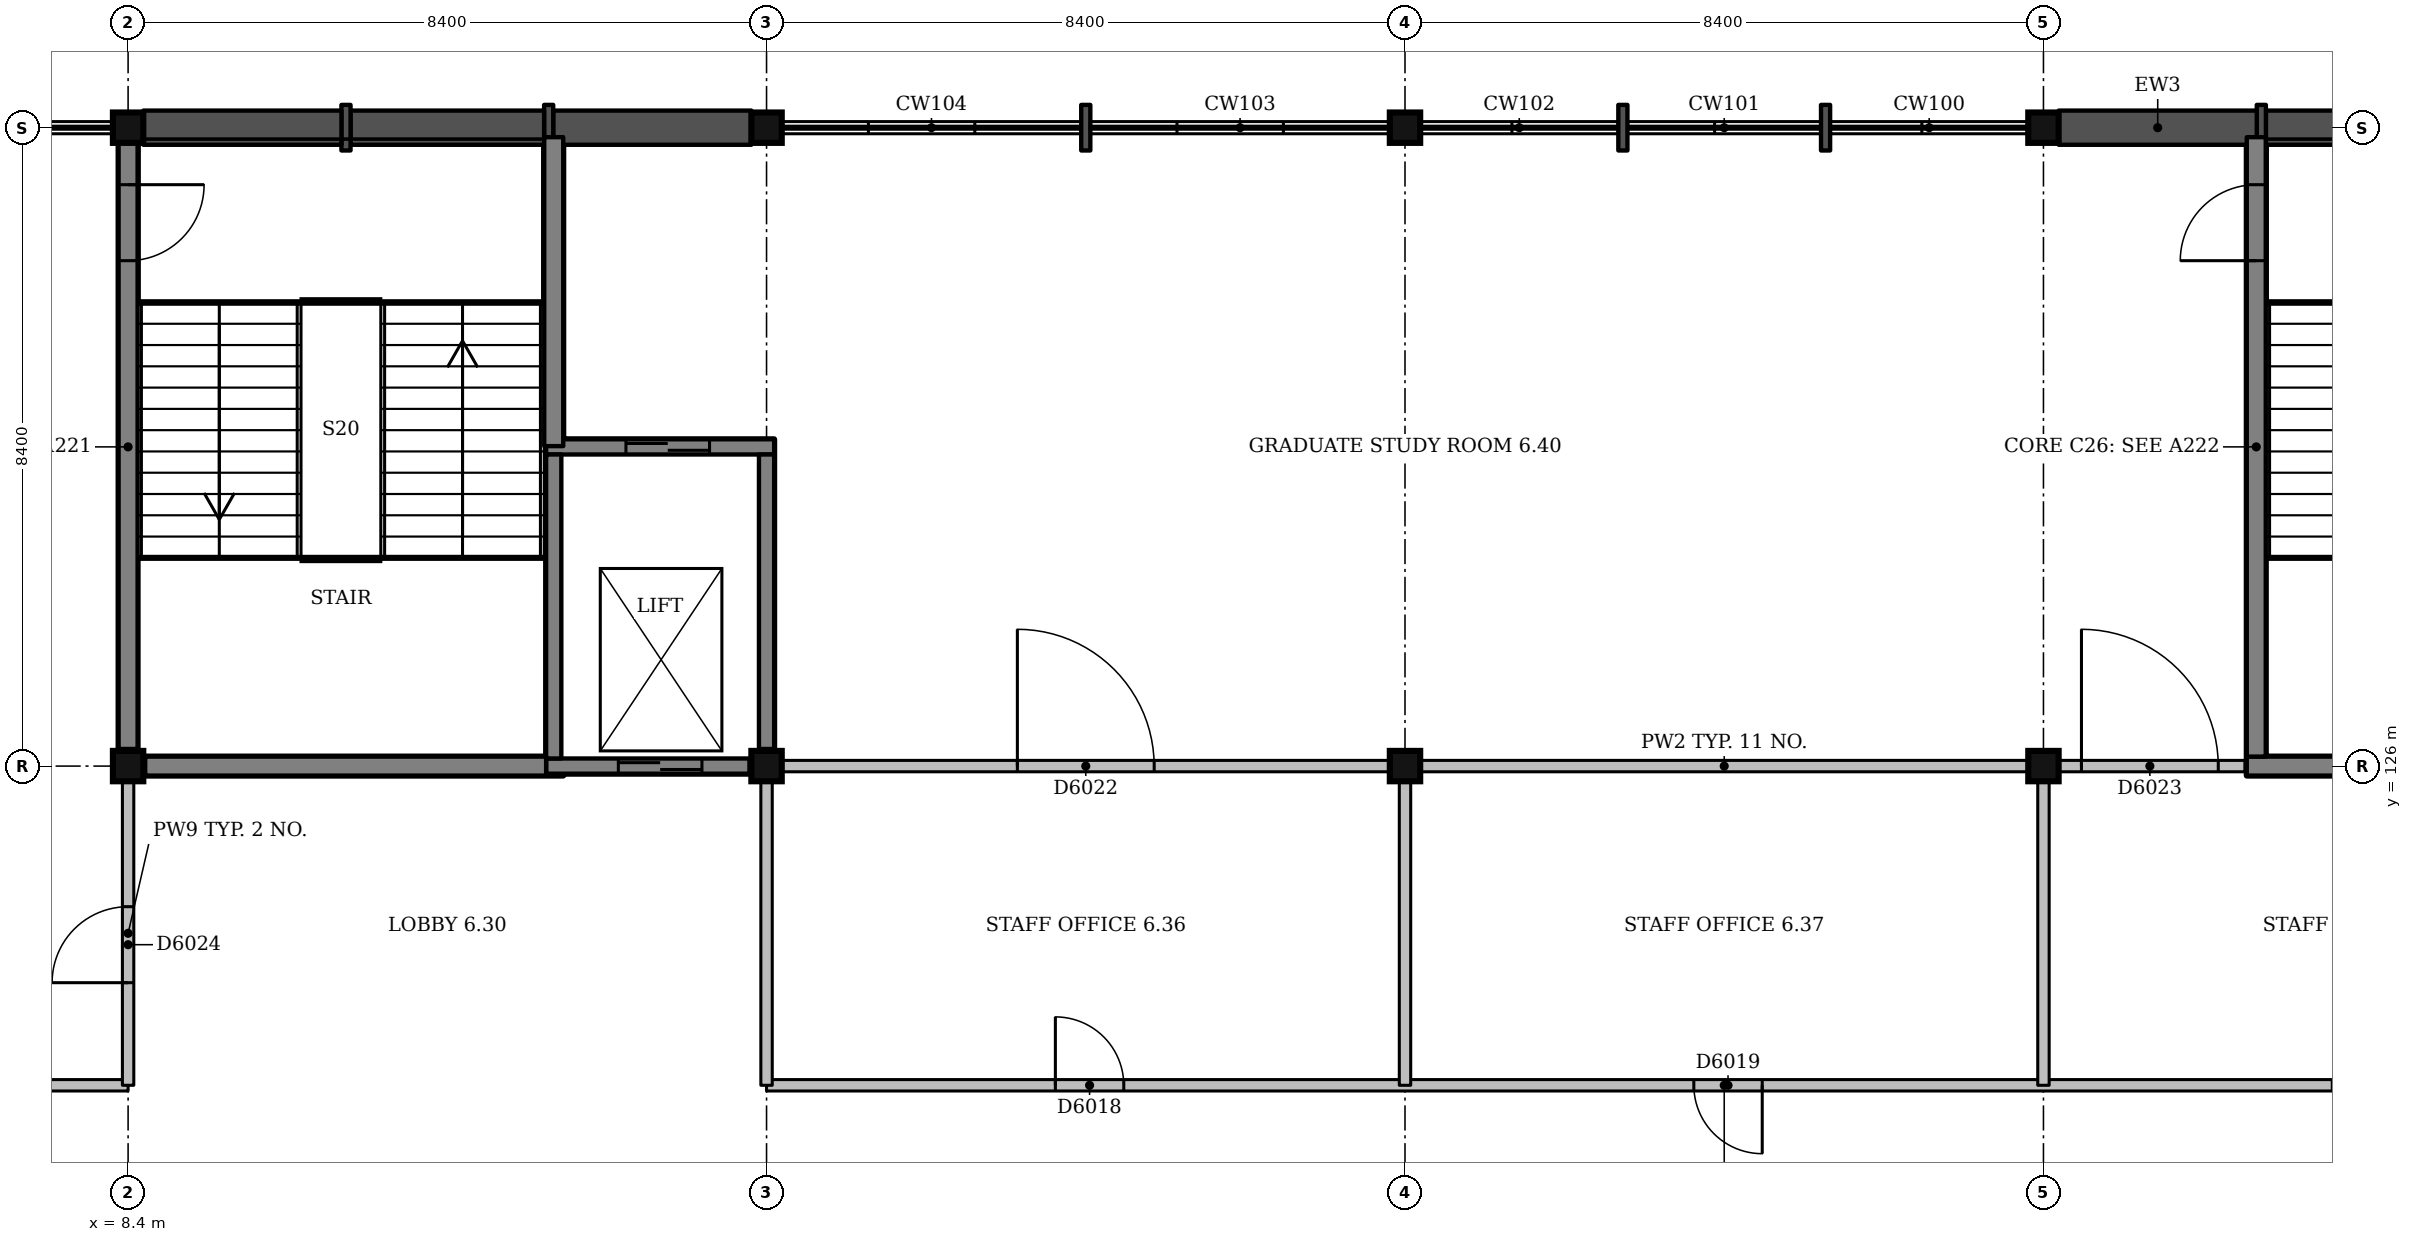
"""IFC4 building model, lengths in metres.
Left out: names, types, materials, properties, quantities, classifications, styles, units other than length and angle.
Written with IfcOpenShell. Run it as: python <this file> out.ifc"""

import sys

from ifc_helpers import new_model, si_unit, direction, frame, frame_2d, origin, origin_2d, place, context, subcontext, project, spatial, rectangle, extrude, element, fill, save


model = new_model("IFC4")
c1 = context("Model", 3, precision=1e-05, world=origin(), true_north=direction((0.0, 1.0)))
c2 = subcontext(c1, "Body", "Model", "MODEL_VIEW")
j1 = project(units=[si_unit("LENGTHUNIT", "METRE"), si_unit("PLANEANGLEUNIT", "RADIAN")], contexts=[c1])
p1 = place(None, origin())
s1 = spatial("IfcSite", under=j1, at=p1, CompositionType="ELEMENT")
p2 = place(p1, origin())
s2 = spatial("IfcBuilding", under=s1, at=p2, CompositionType="ELEMENT")
p3 = place(p2, frame((0.0, 0.0, 27.0)))
s3 = spatial("IfcBuildingStorey", under=s2, at=p3, CompositionType="ELEMENT", Elevation=27.0)
for number, where, z_axis, x_axis in (
    (1, (8.4, 126.0, 0.0), (0.0, 0.0, 1.0), (1.0, 0.0, 0.0)),
    (2, (8.4, 134.4, 0.0), (0.0, 0.0, 1.0), (1.0, 0.0, 0.0)),
    (3, (16.8, 126.0, 0.0), (0.0, 0.0, 1.0), (1.0, 0.0, 0.0)),
    (4, (16.8, 134.4, 0.0), (0.0, 0.0, 1.0), (1.0, 0.0, 0.0)),
    (5, (25.2, 126.0, 0.0), (0.0, 0.0, 1.0), (1.0, 0.0, 0.0)),
    (6, (25.2, 134.4, 0.0), (0.0, 0.0, 1.0), (1.0, 0.0, 0.0)),
    (7, (33.6, 126.0, 0.0), (0.0, 0.0, 1.0), (1.0, 0.0, 0.0)),
    (8, (33.6, 134.4, 0.0), (0.0, 0.0, 1.0), (1.0, 0.0, 0.0)),
):
    element("IfcColumn", number, at=place(p3, frame(where, z_axis=z_axis, x_axis=x_axis)), inside=s3, PredefinedType="COLUMN", context=c2, shape_type="SweptSolid", body=[
        extrude(rectangle(XDim=0.4, YDim=0.4, at=origin_2d()), origin(), (0.0, 0.0, 1.0), 4.5),
    ])
p4 = place(p3, frame((13.9, 126.0, 0.0), z_axis=(0.0, 0.0, 1.0), x_axis=(1.0, 0.0, 0.0)))
e9 = element("IfcWall", 9, at=p4, inside=s3, PredefinedType="SHEAR", context=c2, shape_type="SweptSolid", body=[
    extrude(rectangle(XDim=2.675, YDim=0.2, at=frame_2d((1.337, 0.0))), origin(), (0.0, 0.0, 1.0), 4.5),
])
p5 = place(p4, frame((0.95, 0.0, 0.0)))
e10 = element("IfcOpeningElement", 10, at=p5, cuts=e9, PredefinedType="OPENING", context=c2, shape_type="SweptSolid", body=[
    extrude(rectangle(XDim=1.1, YDim=2.1, at=frame_2d((0.55, 1.05))), frame((0.0, 0.11, 0.0), z_axis=(0.0, -1.0, 0.0), x_axis=(1.0, 0.0, 0.0)), (0.0, 0.0, 1.0), 0.22),
])
p6 = place(p3, frame((13.9, 130.2, 0.0), z_axis=(0.0, 0.0, 1.0), x_axis=(1.0, 0.0, 0.0)))
e11 = element("IfcWall", 11, at=p6, inside=s3, PredefinedType="SHEAR", context=c2, shape_type="SweptSolid", body=[
    extrude(rectangle(XDim=3.0, YDim=0.2, at=frame_2d((1.5, 0.0))), origin(), (0.0, 0.0, 1.0), 4.5),
])
p7 = place(p6, frame((1.05, 0.0, 0.0)))
e12 = element("IfcOpeningElement", 12, at=p7, cuts=e11, PredefinedType="OPENING", context=c2, shape_type="SweptSolid", body=[
    extrude(rectangle(XDim=1.1, YDim=2.1, at=frame_2d((0.55, 1.05))), frame((0.0, 0.11, 0.0), z_axis=(0.0, -1.0, 0.0), x_axis=(1.0, 0.0, 0.0)), (0.0, 0.0, 1.0), 0.22),
])
p8 = place(p3, frame((14.0, 126.1, 0.0), z_axis=(0.0, 0.0, 1.0), x_axis=(0.0, 1.0, 0.0)))
e13 = element("IfcWall", 13, at=p8, inside=s3, PredefinedType="SHEAR", context=c2, shape_type="SweptSolid", body=[
    extrude(rectangle(XDim=4.0, YDim=0.2, at=frame_2d((2.0, 0.0))), origin(), (0.0, 0.0, 1.0), 4.5),
])
p9 = place(p3, frame((16.8, 126.225, 0.0), z_axis=(0.0, 0.0, 1.0), x_axis=(0.0, 1.0, 0.0)))
e14 = element("IfcWall", 14, at=p9, inside=s3, PredefinedType="SHEAR", context=c2, shape_type="SweptSolid", body=[
    extrude(rectangle(XDim=3.875, YDim=0.2, at=frame_2d((1.938, 0.0))), origin(), (0.0, 0.0, 1.0), 4.5),
])
p10 = place(p3, frame((36.275, 126.0, 0.0), z_axis=(0.0, 0.0, 1.0), x_axis=(1.0, 0.0, 0.0)))
e15 = element("IfcWall", 15, at=p10, inside=s3, PredefinedType="SHEAR", context=c2, shape_type="SweptSolid", body=[
    extrude(rectangle(XDim=5.525, YDim=0.25, at=frame_2d((2.763, 0.0))), origin(), (0.0, 0.0, 1.0), 4.5),
])
p11 = place(p3, frame((36.4, 126.125, 0.0), z_axis=(0.0, 0.0, 1.0), x_axis=(0.0, 1.0, 0.0)))
e16 = element("IfcWall", 16, at=p11, inside=s3, PredefinedType="SHEAR", context=c2, shape_type="SweptSolid", body=[
    extrude(rectangle(XDim=8.15, YDim=0.25, at=frame_2d((4.075, 0.0))), origin(), (0.0, 0.0, 1.0), 4.5),
])
p12 = place(p11, frame((6.525, 0.0, 0.0)))
e17 = element("IfcOpeningElement", 17, at=p12, cuts=e16, PredefinedType="OPENING", context=c2, shape_type="SweptSolid", body=[
    extrude(rectangle(XDim=1.0, YDim=2.1, at=frame_2d((0.5, 1.05))), frame((0.0, 0.135, 0.0), z_axis=(0.0, -1.0, 0.0), x_axis=(1.0, 0.0, 0.0)), (0.0, 0.0, 1.0), 0.27),
])
p13 = place(p3, frame((8.625, 126.0, 0.0), z_axis=(0.0, 0.0, 1.0), x_axis=(1.0, 0.0, 0.0)))
e18 = element("IfcWall", 18, at=p13, inside=s3, PredefinedType="SHEAR", context=c2, shape_type="SweptSolid", body=[
    extrude(rectangle(XDim=5.275, YDim=0.25, at=frame_2d((2.637, 0.0))), origin(), (0.0, 0.0, 1.0), 4.5),
])
p14 = place(p3, frame((8.4, 126.225, 0.0), z_axis=(0.0, 0.0, 1.0), x_axis=(0.0, 1.0, 0.0)))
e19 = element("IfcWall", 19, at=p14, inside=s3, PredefinedType="SHEAR", context=c2, shape_type="SweptSolid", body=[
    extrude(rectangle(XDim=7.975, YDim=0.25, at=frame_2d((3.987, 0.0))), origin(), (0.0, 0.0, 1.0), 4.5),
])
p15 = place(p14, frame((6.425, 0.0, 0.0)))
e20 = element("IfcOpeningElement", 20, at=p15, cuts=e19, PredefinedType="OPENING", context=c2, shape_type="SweptSolid", body=[
    extrude(rectangle(XDim=1.0, YDim=2.1, at=frame_2d((0.5, 1.05))), frame((0.0, 0.135, 0.0), z_axis=(0.0, -1.0, 0.0), x_axis=(1.0, 0.0, 0.0)), (0.0, 0.0, 1.0), 0.27),
])
p16 = place(p3, frame((14.0, 130.21, 0.0), z_axis=(0.0, 0.0, 1.0), x_axis=(0.0, 1.0, 0.0)))
e21 = element("IfcWall", 21, at=p16, inside=s3, PredefinedType="SHEAR", context=c2, shape_type="SweptSolid", body=[
    extrude(rectangle(XDim=4.065, YDim=0.25, at=frame_2d((2.032, 0.0))), origin(), (0.0, 0.0, 1.0), 4.5),
])
p17 = place(p3, frame((39.073, 134.4, 0.0), z_axis=(0.0, 0.0, 1.0), x_axis=(-1.0, 0.0, 0.0)))
e22 = element("IfcWall", 22, at=p17, inside=s3, PredefinedType="SOLIDWALL", context=c2, shape_type="SweptSolid", body=[
    extrude(rectangle(XDim=2.547, YDim=0.45, at=frame_2d((1.273, 0.0))), origin(), (0.0, 0.0, 1.0), 3.35),
])
p18 = place(p3, frame((36.527, 134.4, 0.0), z_axis=(0.0, 0.0, 1.0), x_axis=(-1.0, 0.0, 0.0)))
e23 = element("IfcWall", 23, at=p18, inside=s3, PredefinedType="SOLIDWALL", context=c2, shape_type="SweptSolid", body=[
    extrude(rectangle(XDim=0.12, YDim=0.6, at=frame_2d((0.06, 0.0))), origin(), (0.0, 0.0, 1.0), 3.35),
])
p19 = place(p3, frame((36.407, 134.4, 0.0), z_axis=(0.0, 0.0, 1.0), x_axis=(-1.0, 0.0, 0.0)))
e24 = element("IfcWall", 24, at=p19, inside=s3, PredefinedType="SOLIDWALL", context=c2, shape_type="SweptSolid", body=[
    extrude(rectangle(XDim=2.607, YDim=0.45, at=frame_2d((1.303, 0.0))), origin(), (0.0, 0.0, 1.0), 3.35),
])
p20 = place(p3, frame((30.793, 134.4, 0.0), z_axis=(0.0, 0.0, 1.0), x_axis=(-1.0, 0.0, 0.0)))
e25 = element("IfcWall", 25, at=p20, inside=s3, PredefinedType="SOLIDWALL", context=c2, shape_type="SweptSolid", body=[
    extrude(rectangle(XDim=0.12, YDim=0.6, at=frame_2d((0.06, 0.0))), origin(), (0.0, 0.0, 1.0), 3.35),
])
for number, where, z_axis, x_axis in (
    (26, (28.127, 134.4, 0.0), (0.0, 0.0, 1.0), (-1.0, 0.0, 0.0)),
    (27, (21.06, 134.4, 0.0), (0.0, 0.0, 1.0), (-1.0, 0.0, 0.0)),
):
    element("IfcWall", number, at=place(p3, frame(where, z_axis=z_axis, x_axis=x_axis)), inside=s3, PredefinedType="SOLIDWALL", context=c2, shape_type="SweptSolid", body=[
        extrude(rectangle(XDim=0.12, YDim=0.6, at=frame_2d((0.06, 0.0))), origin(), (0.0, 0.0, 1.0), 3.35),
    ])
p21 = place(p3, frame((16.6, 134.4, 0.0), z_axis=(0.0, 0.0, 1.0), x_axis=(-1.0, 0.0, 0.0)))
e28 = element("IfcWall", 28, at=p21, inside=s3, PredefinedType="SOLIDWALL", context=c2, shape_type="SweptSolid", body=[
    extrude(rectangle(XDim=2.607, YDim=0.45, at=frame_2d((1.303, 0.0))), origin(), (0.0, 0.0, 1.0), 3.35),
])
p22 = place(p3, frame((13.993, 134.4, 0.0), z_axis=(0.0, 0.0, 1.0), x_axis=(-1.0, 0.0, 0.0)))
e29 = element("IfcWall", 29, at=p22, inside=s3, PredefinedType="SOLIDWALL", context=c2, shape_type="SweptSolid", body=[
    extrude(rectangle(XDim=0.12, YDim=0.6, at=frame_2d((0.06, 0.0))), origin(), (0.0, 0.0, 1.0), 3.35),
])
p23 = place(p3, frame((13.873, 134.4, 0.0), z_axis=(0.0, 0.0, 1.0), x_axis=(-1.0, 0.0, 0.0)))
e30 = element("IfcWall", 30, at=p23, inside=s3, PredefinedType="SOLIDWALL", context=c2, shape_type="SweptSolid", body=[
    extrude(rectangle(XDim=2.547, YDim=0.45, at=frame_2d((1.273, 0.0))), origin(), (0.0, 0.0, 1.0), 3.35),
])
p24 = place(p3, frame((11.327, 134.4, 0.0), z_axis=(0.0, 0.0, 1.0), x_axis=(-1.0, 0.0, 0.0)))
e31 = element("IfcWall", 31, at=p24, inside=s3, PredefinedType="SOLIDWALL", context=c2, shape_type="SweptSolid", body=[
    extrude(rectangle(XDim=0.12, YDim=0.6, at=frame_2d((0.06, 0.0))), origin(), (0.0, 0.0, 1.0), 3.35),
])
p25 = place(p3, frame((11.207, 134.4, 0.0), z_axis=(0.0, 0.0, 1.0), x_axis=(-1.0, 0.0, 0.0)))
e32 = element("IfcWall", 32, at=p25, inside=s3, PredefinedType="SOLIDWALL", context=c2, shape_type="SweptSolid", body=[
    extrude(rectangle(XDim=2.607, YDim=0.45, at=frame_2d((1.303, 0.0))), origin(), (0.0, 0.0, 1.0), 3.35),
])
p26 = place(p3, frame((0.275, 121.8, 0.0), z_axis=(0.0, 0.0, 1.0), x_axis=(1.0, 0.0, 0.0)))
e33 = element("IfcWall", 33, at=p26, inside=s3, PredefinedType="PARTITIONING", context=c2, shape_type="SweptSolid", body=[
    extrude(rectangle(XDim=8.125, YDim=0.15, at=frame_2d((4.062, 0.0))), origin(), (0.0, 0.0, 1.0), 3.4),
])
p27 = place(p3, frame((16.8, 121.8, 0.0), z_axis=(0.0, 0.0, 1.0), x_axis=(1.0, 0.0, 0.0)))
e34 = element("IfcWall", 34, at=p27, inside=s3, PredefinedType="PARTITIONING", context=c2, shape_type="SweptSolid", body=[
    extrude(rectangle(XDim=25.2, YDim=0.15, at=frame_2d((12.6, 0.0))), origin(), (0.0, 0.0, 1.0), 3.35),
])
p28 = place(p27, frame((3.8, 0.0, 0.0)))
e35 = element("IfcOpeningElement", 35, at=p28, cuts=e34, PredefinedType="OPENING", context=c2, shape_type="SweptSolid", body=[
    extrude(rectangle(XDim=0.9, YDim=2.1, at=frame_2d((0.45, 1.05))), frame((0.0, 0.085, 0.0), z_axis=(0.0, -1.0, 0.0), x_axis=(1.0, 0.0, 0.0)), (0.0, 0.0, 1.0), 0.17),
])
p29 = place(p27, frame((12.2, 0.0, 0.0)))
e36 = element("IfcOpeningElement", 36, at=p29, cuts=e34, PredefinedType="OPENING", context=c2, shape_type="SweptSolid", body=[
    extrude(rectangle(XDim=0.9, YDim=2.1, at=frame_2d((0.45, 1.05))), frame((0.0, 0.085, 0.0), z_axis=(0.0, -1.0, 0.0), x_axis=(1.0, 0.0, 0.0)), (0.0, 0.0, 1.0), 0.17),
])
p30 = place(p27, frame((20.6, 0.0, 0.0)))
e37 = element("IfcOpeningElement", 37, at=p30, cuts=e34, PredefinedType="OPENING", context=c2, shape_type="SweptSolid", body=[
    extrude(rectangle(XDim=0.9, YDim=2.1, at=frame_2d((0.45, 1.05))), frame((0.0, 0.085, 0.0), z_axis=(0.0, -1.0, 0.0), x_axis=(1.0, 0.0, 0.0)), (0.0, 0.0, 1.0), 0.17),
])
p31 = place(p3, frame((17.0, 126.0, 0.0), z_axis=(0.0, 0.0, 1.0), x_axis=(1.0, 0.0, 0.0)))
e38 = element("IfcWall", 38, at=p31, inside=s3, PredefinedType="PARTITIONING", context=c2, shape_type="SweptSolid", body=[
    extrude(rectangle(XDim=8.0, YDim=0.15, at=frame_2d((4.0, 0.0))), origin(), (0.0, 0.0, 1.0), 3.4),
])
p32 = place(p31, frame((3.1, 0.0, 0.0)))
e39 = element("IfcOpeningElement", 39, at=p32, cuts=e38, PredefinedType="OPENING", context=c2, shape_type="SweptSolid", body=[
    extrude(rectangle(XDim=1.8, YDim=2.1, at=frame_2d((0.9, 1.05))), frame((0.0, 0.085, 0.0), z_axis=(0.0, -1.0, 0.0), x_axis=(1.0, 0.0, 0.0)), (0.0, 0.0, 1.0), 0.17),
])
p33 = place(p3, frame((25.4, 126.0, 0.0), z_axis=(0.0, 0.0, 1.0), x_axis=(1.0, 0.0, 0.0)))
e40 = element("IfcWall", 40, at=p33, inside=s3, PredefinedType="PARTITIONING", context=c2, shape_type="SweptSolid", body=[
    extrude(rectangle(XDim=8.0, YDim=0.15, at=frame_2d((4.0, 0.0))), origin(), (0.0, 0.0, 1.0), 3.4),
])
p34 = place(p3, frame((33.8, 126.0, 0.0), z_axis=(0.0, 0.0, 1.0), x_axis=(1.0, 0.0, 0.0)))
e41 = element("IfcWall", 41, at=p34, inside=s3, PredefinedType="PARTITIONING", context=c2, shape_type="SweptSolid", body=[
    extrude(rectangle(XDim=2.45, YDim=0.15, at=frame_2d((1.225, 0.0))), origin(), (0.0, 0.0, 1.0), 3.4),
])
p35 = place(p34, frame((0.3, 0.0, 0.0)))
e42 = element("IfcOpeningElement", 42, at=p35, cuts=e41, PredefinedType="OPENING", context=c2, shape_type="SweptSolid", body=[
    extrude(rectangle(XDim=1.8, YDim=2.1, at=frame_2d((0.9, 1.05))), frame((0.0, 0.085, 0.0), z_axis=(0.0, -1.0, 0.0), x_axis=(1.0, 0.0, 0.0)), (0.0, 0.0, 1.0), 0.17),
])
p36 = place(p3, frame((8.4, 121.8, 0.0), z_axis=(0.0, 0.0, 1.0), x_axis=(0.0, 1.0, 0.0)))
e43 = element("IfcWall", 43, at=p36, inside=s3, PredefinedType="PARTITIONING", context=c2, shape_type="SweptSolid", body=[
    extrude(rectangle(XDim=4.0, YDim=0.15, at=frame_2d((2.0, 0.0))), origin(), (0.0, 0.0, 1.0), 3.4),
])
p37 = place(p36, frame((1.35, 0.0, 0.0)))
e44 = element("IfcOpeningElement", 44, at=p37, cuts=e43, PredefinedType="OPENING", context=c2, shape_type="SweptSolid", body=[
    extrude(rectangle(XDim=1.0, YDim=2.1, at=frame_2d((0.5, 1.05))), frame((0.0, 0.085, 0.0), z_axis=(0.0, -1.0, 0.0), x_axis=(1.0, 0.0, 0.0)), (0.0, 0.0, 1.0), 0.17),
])
for number, where, z_axis, x_axis in (
    (45, (16.8, 121.8, 0.0), (0.0, 0.0, 1.0), (0.0, 1.0, 0.0)),
    (46, (25.2, 121.8, 0.0), (0.0, 0.0, 1.0), (0.0, 1.0, 0.0)),
    (47, (33.6, 121.8, 0.0), (0.0, 0.0, 1.0), (0.0, 1.0, 0.0)),
):
    element("IfcWall", number, at=place(p3, frame(where, z_axis=z_axis, x_axis=x_axis)), inside=s3, PredefinedType="PARTITIONING", context=c2, shape_type="SweptSolid", body=[
        extrude(rectangle(XDim=4.0, YDim=0.15, at=frame_2d((2.0, 0.0))), origin(), (0.0, 0.0, 1.0), 3.4),
    ])
p38 = place(p28, origin())
e48 = element("IfcDoor", 48, at=p38, inside=s3, OperationType="SINGLE_SWING_LEFT", PredefinedType="DOOR", context=c2, shape_type="SweptSolid", body=[
    extrude(rectangle(XDim=0.9, YDim=2.1, at=frame_2d((0.45, 1.05))), frame((0.0, 0.025, 0.0), z_axis=(0.0, -1.0, 0.0), x_axis=(1.0, 0.0, 0.0)), (0.0, 0.0, 1.0), 0.05),
])
fill(e35, e48)
p39 = place(p29, origin())
e49 = element("IfcDoor", 49, at=p39, inside=s3, OperationType="SINGLE_SWING_RIGHT", PredefinedType="DOOR", context=c2, shape_type="SweptSolid", body=[
    extrude(rectangle(XDim=0.9, YDim=2.1, at=frame_2d((0.45, 1.05))), frame((0.0, 0.025, 0.0), z_axis=(0.0, -1.0, 0.0), x_axis=(1.0, 0.0, 0.0)), (0.0, 0.0, 1.0), 0.05),
])
fill(e36, e49)
p40 = place(p32, origin())
e50 = element("IfcDoor", 50, at=p40, inside=s3, OperationType="DOUBLE_DOOR_SINGLE_SWING", PredefinedType="DOOR", context=c2, shape_type="SweptSolid", body=[
    extrude(rectangle(XDim=1.8, YDim=2.1, at=frame_2d((0.9, 1.05))), frame((0.0, 0.025, 0.0), z_axis=(0.0, -1.0, 0.0), x_axis=(1.0, 0.0, 0.0)), (0.0, 0.0, 1.0), 0.05),
])
fill(e39, e50)
p41 = place(p35, origin())
e51 = element("IfcDoor", 51, at=p41, inside=s3, OperationType="DOUBLE_DOOR_SINGLE_SWING", PredefinedType="DOOR", context=c2, shape_type="SweptSolid", body=[
    extrude(rectangle(XDim=1.8, YDim=2.1, at=frame_2d((0.9, 1.05))), frame((0.0, 0.025, 0.0), z_axis=(0.0, -1.0, 0.0), x_axis=(1.0, 0.0, 0.0)), (0.0, 0.0, 1.0), 0.05),
])
fill(e42, e51)
p42 = place(p37, origin())
e52 = element("IfcDoor", 52, at=p42, inside=s3, OperationType="SINGLE_SWING_LEFT", PredefinedType="DOOR", context=c2, shape_type="SweptSolid", body=[
    extrude(rectangle(XDim=1.0, YDim=2.1, at=frame_2d((0.5, 1.05))), frame((0.0, 0.025, 0.0), z_axis=(0.0, -1.0, 0.0), x_axis=(1.0, 0.0, 0.0)), (0.0, 0.0, 1.0), 0.05),
])
fill(e44, e52)
p43 = place(p12, origin())
e53 = element("IfcDoor", 53, at=p43, inside=s3, OperationType="SINGLE_SWING_LEFT", PredefinedType="DOOR", context=c2, shape_type="SweptSolid", body=[
    extrude(rectangle(XDim=1.0, YDim=2.1, at=frame_2d((0.5, 1.05))), frame((0.0, 0.025, 0.0), z_axis=(0.0, -1.0, 0.0), x_axis=(1.0, 0.0, 0.0)), (0.0, 0.0, 1.0), 0.05),
])
fill(e17, e53)
p44 = place(p15, origin())
e54 = element("IfcDoor", 54, at=p44, inside=s3, OperationType="SINGLE_SWING_RIGHT", PredefinedType="DOOR", context=c2, shape_type="SweptSolid", body=[
    extrude(rectangle(XDim=1.0, YDim=2.1, at=frame_2d((0.5, 1.05))), frame((0.0, 0.025, 0.0), z_axis=(0.0, -1.0, 0.0), x_axis=(1.0, 0.0, 0.0)), (0.0, 0.0, 1.0), 0.05),
])
fill(e20, e54)
p45 = place(p5, origin())
e55 = element("IfcDoor", 55, at=p45, inside=s3, OperationType="SLIDING_TO_LEFT", PredefinedType="DOOR", context=c2, shape_type="SweptSolid", body=[
    extrude(rectangle(XDim=1.1, YDim=2.1, at=frame_2d((0.55, 1.05))), frame((0.0, 0.025, 0.0), z_axis=(0.0, -1.0, 0.0), x_axis=(1.0, 0.0, 0.0)), (0.0, 0.0, 1.0), 0.05),
])
fill(e10, e55)
p46 = place(p7, origin())
e56 = element("IfcDoor", 56, at=p46, inside=s3, OperationType="SLIDING_TO_RIGHT", PredefinedType="DOOR", context=c2, shape_type="SweptSolid", body=[
    extrude(rectangle(XDim=1.1, YDim=2.1, at=frame_2d((0.55, 1.05))), frame((0.0, 0.025, 0.0), z_axis=(0.0, -1.0, 0.0), x_axis=(1.0, 0.0, 0.0)), (0.0, 0.0, 1.0), 0.05),
])
fill(e12, e56)
save(model, sys.argv[1])
